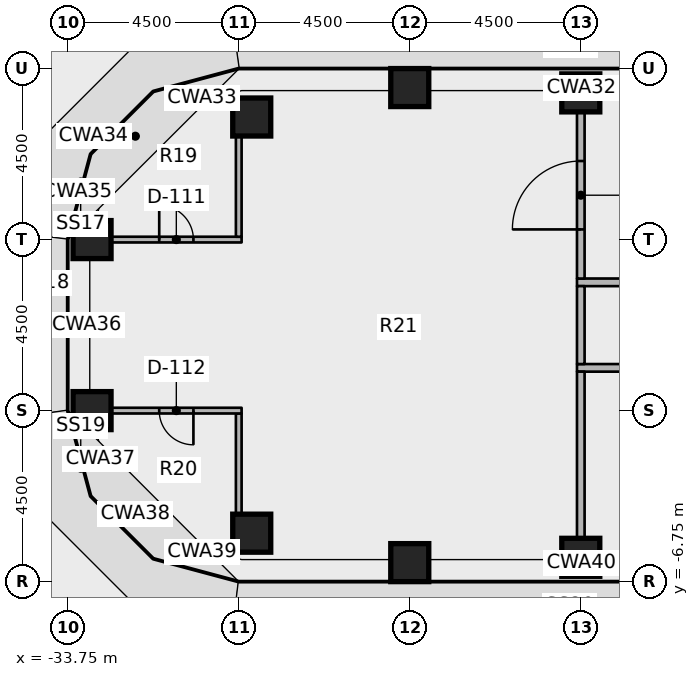
"""IFC4 building model, lengths in metres.
Left out: names, types, materials, properties, quantities, classifications, styles, units other than length and angle.
Written with IfcOpenShell. Run it as: python <this file> out.ifc"""

import sys

from ifc_helpers import new_model, si_unit, direction, frame, frame_2d, origin, origin_2d, place, context, subcontext, project, spatial, rectangle, extrude, element, fill, save


model = new_model("IFC4")
c1 = context("Model", 3, precision=1e-05, world=origin(), true_north=direction((0.0, 1.0)))
c2 = subcontext(c1, "Body", "Model", "MODEL_VIEW")
j1 = project(units=[si_unit("LENGTHUNIT", "METRE"), si_unit("PLANEANGLEUNIT", "RADIAN")], contexts=[c1])
p1 = place(None, origin())
s1 = spatial("IfcSite", under=j1, at=p1, CompositionType="ELEMENT")
p2 = place(p1, origin())
s2 = spatial("IfcBuilding", under=s1, at=p2, CompositionType="ELEMENT")
p3 = place(p2, frame((0.0, 0.0, 27.0)))
s3 = spatial("IfcBuildingStorey", under=s2, at=p3, CompositionType="ELEMENT", Elevation=27.0)
for number, where, z_axis, x_axis in (
    (1, (-33.11, -2.25, 0.0), (0.0, 0.0, 1.0), (1.0, 0.0, 0.0)),
    (2, (-33.11, 2.25, 0.0), (0.0, 0.0, 1.0), (1.0, 0.0, 0.0)),
    (3, (-28.908, -5.475, 0.0), (0.0, 0.0, 1.0), (1.0, 0.0, 0.0)),
    (4, (-28.908, 5.475, 0.0), (0.0, 0.0, 1.0), (1.0, 0.0, 0.0)),
    (5, (-24.75, -6.25, 0.0), (0.0, 0.0, 1.0), (1.0, 0.0, 0.0)),
    (6, (-24.75, 6.25, 0.0), (0.0, 0.0, 1.0), (1.0, 0.0, 0.0)),
    (7, (-20.25, -6.11, 0.0), (0.0, 0.0, 1.0), (1.0, 0.0, 0.0)),
    (8, (-20.25, 6.11, 0.0), (0.0, 0.0, 1.0), (1.0, 0.0, 0.0)),
):
    element("IfcColumn", number, at=place(p3, frame(where, z_axis=z_axis, x_axis=x_axis)), inside=s3, PredefinedType="COLUMN", context=c2, shape_type="SweptSolid", body=[
        extrude(rectangle(XDim=1.0, YDim=1.0, at=origin_2d()), origin(), (0.0, 0.0, 1.0), 4.05),
    ])
p4 = place(p3, frame((-20.35, 1.125, 0.0), z_axis=(0.0, 0.0, 1.0), x_axis=(1.0, 0.0, 0.0)))
e9 = element("IfcWall", 9, at=p4, inside=s3, PredefinedType="PARTITIONING", context=c2, shape_type="SweptSolid", body=[
    extrude(rectangle(XDim=4.7, YDim=0.2, at=frame_2d((2.35, 0.0))), origin(), (0.0, 0.0, 1.0), 3.131),
])
p5 = place(p4, frame((1.85, 0.0, 0.0)))
e10 = element("IfcOpeningElement", 10, at=p5, cuts=e9, PredefinedType="OPENING", context=c2, shape_type="SweptSolid", body=[
    extrude(rectangle(XDim=1.0, YDim=2.1, at=frame_2d((0.5, 1.05))), frame((0.0, 0.11, 0.0), z_axis=(0.0, -1.0, 0.0), x_axis=(1.0, 0.0, 0.0)), (0.0, 0.0, 1.0), 0.22),
])
p6 = place(p3, frame((-11.15, -1.125, 0.0), z_axis=(0.0, 0.0, 1.0), x_axis=(-1.0, 0.0, 0.0)))
e11 = element("IfcWall", 11, at=p6, inside=s3, PredefinedType="PARTITIONING", context=c2, shape_type="SweptSolid", body=[
    extrude(rectangle(XDim=9.2, YDim=0.2, at=frame_2d((4.6, 0.0))), origin(), (0.0, 0.0, 1.0), 3.131),
])
p7 = place(p6, frame((4.1, 0.0, 0.0)))
e12 = element("IfcOpeningElement", 12, at=p7, cuts=e11, PredefinedType="OPENING", context=c2, shape_type="SweptSolid", body=[
    extrude(rectangle(XDim=1.0, YDim=2.1, at=frame_2d((0.5, 1.05))), frame((0.0, 0.11, 0.0), z_axis=(0.0, -1.0, 0.0), x_axis=(1.0, 0.0, 0.0)), (0.0, 0.0, 1.0), 0.22),
])
p8 = place(p3, frame((-20.25, -1.025, 0.0), z_axis=(0.0, 0.0, 1.0), x_axis=(0.0, 1.0, 0.0)))
e13 = element("IfcWall", 13, at=p8, inside=s3, PredefinedType="PARTITIONING", context=c2, shape_type="SweptSolid", body=[
    extrude(rectangle(XDim=2.05, YDim=0.2, at=frame_2d((1.025, 0.0))), origin(), (0.0, 0.0, 1.0), 3.131),
])
p9 = place(p3, frame((-20.25, 1.225, 0.0), z_axis=(0.0, 0.0, 1.0), x_axis=(0.0, 1.0, 0.0)))
e14 = element("IfcWall", 14, at=p9, inside=s3, PredefinedType="PARTITIONING", context=c2, shape_type="SweptSolid", body=[
    extrude(rectangle(XDim=4.385, YDim=0.2, at=frame_2d((2.192, 0.0))), origin(), (0.0, 0.0, 1.0), 3.131),
])
p10 = place(p9, frame((1.292, 0.0, 0.0)))
e15 = element("IfcOpeningElement", 15, at=p10, cuts=e14, PredefinedType="OPENING", context=c2, shape_type="SweptSolid", body=[
    extrude(rectangle(XDim=1.8, YDim=2.1, at=frame_2d((0.9, 1.05))), frame((0.0, 0.11, 0.0), z_axis=(0.0, -1.0, 0.0), x_axis=(1.0, 0.0, 0.0)), (0.0, 0.0, 1.0), 0.22),
])
p11 = place(p3, frame((-20.25, -5.61, 0.0), z_axis=(0.0, 0.0, 1.0), x_axis=(0.0, 1.0, 0.0)))
e16 = element("IfcWall", 16, at=p11, inside=s3, PredefinedType="PARTITIONING", context=c2, shape_type="SweptSolid", body=[
    extrude(rectangle(XDim=4.385, YDim=0.2, at=frame_2d((2.192, 0.0))), origin(), (0.0, 0.0, 1.0), 3.131),
])
p12 = place(p3, frame((-32.61, 2.25, 0.0), z_axis=(0.0, 0.0, 1.0), x_axis=(1.0, 0.0, 0.0)))
e17 = element("IfcWall", 17, at=p12, inside=s3, PredefinedType="PARTITIONING", context=c2, shape_type="SweptSolid", body=[
    extrude(rectangle(XDim=3.435, YDim=0.15, at=frame_2d((1.718, 0.0))), origin(), (0.0, 0.0, 1.0), 3.131),
])
p13 = place(p12, frame((1.268, 0.0, 0.0)))
e18 = element("IfcOpeningElement", 18, at=p13, cuts=e17, PredefinedType="OPENING", context=c2, shape_type="SweptSolid", body=[
    extrude(rectangle(XDim=0.9, YDim=2.1, at=frame_2d((0.45, 1.05))), frame((0.0, 0.085, 0.0), z_axis=(0.0, -1.0, 0.0), x_axis=(1.0, 0.0, 0.0)), (0.0, 0.0, 1.0), 0.17),
])
for number, where, z_axis, x_axis in (
    (19, (-29.25, 2.325, 0.0), (0.0, 0.0, 1.0), (0.0, 1.0, 0.0)),
    (20, (-29.25, -4.975, 0.0), (0.0, 0.0, 1.0), (0.0, 1.0, 0.0)),
):
    element("IfcWall", number, at=place(p3, frame(where, z_axis=z_axis, x_axis=x_axis)), inside=s3, PredefinedType="PARTITIONING", context=c2, shape_type="SweptSolid", body=[
        extrude(rectangle(XDim=2.65, YDim=0.15, at=frame_2d((1.325, 0.0))), origin(), (0.0, 0.0, 1.0), 3.131),
    ])
p14 = place(p3, frame((-29.175, -2.25, 0.0), z_axis=(0.0, 0.0, 1.0), x_axis=(-1.0, 0.0, 0.0)))
e21 = element("IfcWall", 21, at=p14, inside=s3, PredefinedType="PARTITIONING", context=c2, shape_type="SweptSolid", body=[
    extrude(rectangle(XDim=3.435, YDim=0.15, at=frame_2d((1.718, 0.0))), origin(), (0.0, 0.0, 1.0), 3.131),
])
p15 = place(p14, frame((1.268, 0.0, 0.0)))
e22 = element("IfcOpeningElement", 22, at=p15, cuts=e21, PredefinedType="OPENING", context=c2, shape_type="SweptSolid", body=[
    extrude(rectangle(XDim=0.9, YDim=2.1, at=frame_2d((0.45, 1.05))), frame((0.0, 0.085, 0.0), z_axis=(0.0, -1.0, 0.0), x_axis=(1.0, 0.0, 0.0)), (0.0, 0.0, 1.0), 0.17),
])
p16 = place(p13, origin())
e23 = element("IfcDoor", 23, at=p16, inside=s3, OperationType="SINGLE_SWING_RIGHT", PredefinedType="DOOR", context=c2, shape_type="SweptSolid", body=[
    extrude(rectangle(XDim=0.9, YDim=2.1, at=frame_2d((0.45, 1.05))), frame((0.0, 0.025, 0.0), z_axis=(0.0, -1.0, 0.0), x_axis=(1.0, 0.0, 0.0)), (0.0, 0.0, 1.0), 0.05),
])
fill(e18, e23)
p17 = place(p15, origin())
e24 = element("IfcDoor", 24, at=p17, inside=s3, OperationType="SINGLE_SWING_LEFT", PredefinedType="DOOR", context=c2, shape_type="SweptSolid", body=[
    extrude(rectangle(XDim=0.9, YDim=2.1, at=frame_2d((0.45, 1.05))), frame((0.0, 0.025, 0.0), z_axis=(0.0, -1.0, 0.0), x_axis=(1.0, 0.0, 0.0)), (0.0, 0.0, 1.0), 0.05),
])
fill(e22, e24)
p18 = place(p10, origin())
e25 = element("IfcDoor", 25, at=p18, inside=s3, OperationType="DOUBLE_DOOR_SINGLE_SWING", PredefinedType="DOOR", context=c2, shape_type="SweptSolid", body=[
    extrude(rectangle(XDim=1.8, YDim=2.1, at=frame_2d((0.9, 1.05))), frame((0.0, 0.025, 0.0), z_axis=(0.0, -1.0, 0.0), x_axis=(1.0, 0.0, 0.0)), (0.0, 0.0, 1.0), 0.05),
])
fill(e15, e25)
save(model, sys.argv[1])
